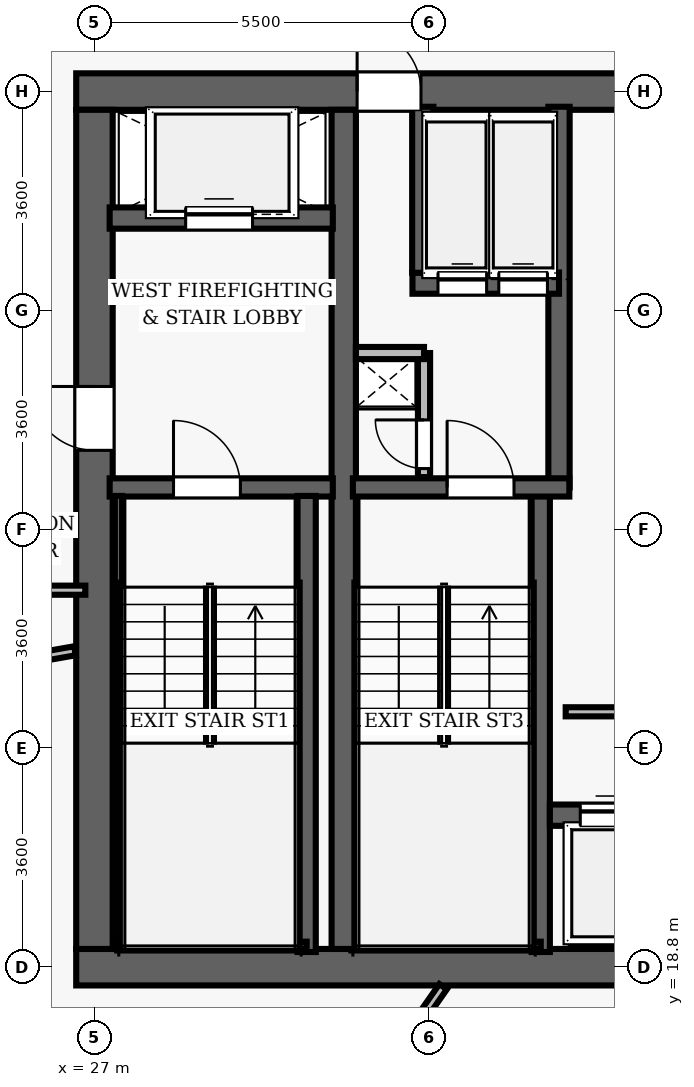
"""IFC4 building model, lengths in metres.
Left out: names, types, materials, properties, quantities, classifications, styles, units other than length and angle.
Written with IfcOpenShell. Run it as: python <this file> out.ifc"""

import sys

from ifc_helpers import new_model, si_unit, direction, frame, frame_2d, origin, place, context, subcontext, project, spatial, rectangle, extrude, element, fill, save


model = new_model("IFC4")
c1 = context("Model", 3, precision=1e-05, world=origin(), true_north=direction((0.0, 1.0)))
c2 = subcontext(c1, "Body", "Model", "MODEL_VIEW")
j1 = project(units=[si_unit("LENGTHUNIT", "METRE"), si_unit("PLANEANGLEUNIT", "RADIAN")], contexts=[c1])
p1 = place(None, origin())
s1 = spatial("IfcSite", under=j1, at=p1, CompositionType="ELEMENT")
p2 = place(p1, origin())
s2 = spatial("IfcBuilding", under=s1, at=p2, CompositionType="ELEMENT")
p3 = place(p2, frame((0.0, 0.0, 158.8)))
s3 = spatial("IfcBuildingStorey", under=s2, at=p3, CompositionType="ELEMENT", Elevation=158.8)
p4 = place(p3, frame((26.7, 18.8, 0.0), z_axis=(0.0, 0.0, 1.0), x_axis=(1.0, 0.0, 0.0)))
e1 = element("IfcWall", 1, at=p4, inside=s3, PredefinedType="SHEAR", context=c2, shape_type="SweptSolid", body=[
    extrude(rectangle(XDim=22.6, YDim=0.6, at=frame_2d((11.3, 0.0))), origin(), (0.0, 0.0, 1.0), 3.5),
])
p5 = place(p4, frame((14.52, 0.0, 0.0)))
e2 = element("IfcOpeningElement", 2, at=p5, cuts=e1, PredefinedType="OPENING", context=c2, shape_type="SweptSolid", body=[
    extrude(rectangle(XDim=1.05, YDim=2.15, at=frame_2d((0.525, 1.075))), frame((0.0, 0.31, 0.0), z_axis=(0.0, -1.0, 0.0), x_axis=(1.0, 0.0, 0.0)), (0.0, 0.0, 1.0), 0.62),
])
p6 = place(p3, frame((26.7, 33.2, 0.0), z_axis=(0.0, 0.0, 1.0), x_axis=(1.0, 0.0, 0.0)))
e3 = element("IfcWall", 3, at=p6, inside=s3, PredefinedType="SHEAR", context=c2, shape_type="SweptSolid", body=[
    extrude(rectangle(XDim=22.6, YDim=0.6, at=frame_2d((11.3, 0.0))), origin(), (0.0, 0.0, 1.0), 3.5),
])
p7 = place(p6, frame((4.62, 0.0, 0.0)))
e4 = element("IfcOpeningElement", 4, at=p7, cuts=e3, PredefinedType="OPENING", context=c2, shape_type="SweptSolid", body=[
    extrude(rectangle(XDim=1.05, YDim=2.15, at=frame_2d((0.525, 1.075))), frame((0.0, 0.31, 0.0), z_axis=(0.0, -1.0, 0.0), x_axis=(1.0, 0.0, 0.0)), (0.0, 0.0, 1.0), 0.62),
])
p8 = place(p6, frame((14.52, 0.0, 0.0)))
e5 = element("IfcOpeningElement", 5, at=p8, cuts=e3, PredefinedType="OPENING", context=c2, shape_type="SweptSolid", body=[
    extrude(rectangle(XDim=1.05, YDim=2.15, at=frame_2d((0.525, 1.075))), frame((0.0, 0.31, 0.0), z_axis=(0.0, -1.0, 0.0), x_axis=(1.0, 0.0, 0.0)), (0.0, 0.0, 1.0), 0.62),
])
p9 = place(p3, frame((27.0, 19.1, 0.0), z_axis=(0.0, 0.0, 1.0), x_axis=(0.0, 1.0, 0.0)))
e6 = element("IfcWall", 6, at=p9, inside=s3, PredefinedType="SHEAR", context=c2, shape_type="SweptSolid", body=[
    extrude(rectangle(XDim=13.8, YDim=0.6, at=frame_2d((6.9, 0.0))), origin(), (0.0, 0.0, 1.0), 3.5),
])
p10 = place(p9, frame((8.2, 0.0, 0.0)))
e7 = element("IfcOpeningElement", 7, at=p10, cuts=e6, PredefinedType="OPENING", context=c2, shape_type="SweptSolid", body=[
    extrude(rectangle(XDim=1.05, YDim=2.15, at=frame_2d((0.525, 1.075))), frame((0.0, 0.31, 0.0), z_axis=(0.0, -1.0, 0.0), x_axis=(1.0, 0.0, 0.0)), (0.0, 0.0, 1.0), 0.62),
])
p11 = place(p3, frame((31.1, 19.1, 0.0), z_axis=(0.0, 0.0, 1.0), x_axis=(0.0, 1.0, 0.0)))
e8 = element("IfcWall", 8, at=p11, inside=s3, PredefinedType="SHEAR", context=c2, shape_type="SweptSolid", body=[
    extrude(rectangle(XDim=13.8, YDim=0.4, at=frame_2d((6.9, 0.0))), origin(), (0.0, 0.0, 1.0), 3.5),
])
p12 = place(p3, frame((27.25, 26.69, 0.0), z_axis=(0.0, 0.0, 1.0), x_axis=(1.0, 0.0, 0.0)))
e9 = element("IfcWall", 9, at=p12, inside=s3, PredefinedType="SHEAR", context=c2, shape_type="SweptSolid", body=[
    extrude(rectangle(XDim=3.67, YDim=0.3, at=frame_2d((1.835, 0.0))), origin(), (0.0, 0.0, 1.0), 3.5),
])
p13 = place(p12, frame((1.05, 0.0, 0.0)))
e10 = element("IfcOpeningElement", 10, at=p13, cuts=e9, PredefinedType="OPENING", context=c2, shape_type="SweptSolid", body=[
    extrude(rectangle(XDim=1.1, YDim=2.15, at=frame_2d((0.55, 1.075))), frame((0.0, 0.16, 0.0), z_axis=(0.0, -1.0, 0.0), x_axis=(1.0, 0.0, 0.0)), (0.0, 0.0, 1.0), 0.32),
])
p14 = place(p3, frame((30.49, 19.05, 0.0), z_axis=(0.0, 0.0, 1.0), x_axis=(0.0, 1.0, 0.0)))
e11 = element("IfcWall", 11, at=p14, inside=s3, PredefinedType="SHEAR", context=c2, shape_type="SweptSolid", body=[
    extrude(rectangle(XDim=7.5, YDim=0.3, at=frame_2d((3.75, 0.0))), origin(), (0.0, 0.0, 1.0), 3.5),
])
p15 = place(p3, frame((27.395, 19.1, 0.0), z_axis=(0.0, 0.0, 1.0), x_axis=(0.0, 1.0, 0.0)))
e12 = element("IfcWall", 12, at=p15, inside=s3, PredefinedType="SHEAR", context=c2, shape_type="SweptSolid", body=[
    extrude(rectangle(XDim=7.45, YDim=0.12, at=frame_2d((3.725, 0.0))), origin(), (0.0, 0.0, 1.0), 3.5),
])
p16 = place(p3, frame((27.395, 19.16, 0.0), z_axis=(0.0, 0.0, 1.0), x_axis=(1.0, 0.0, 0.0)))
e13 = element("IfcWall", 13, at=p16, inside=s3, PredefinedType="SHEAR", context=c2, shape_type="SweptSolid", body=[
    extrude(rectangle(XDim=3.095, YDim=0.12, at=frame_2d((1.547, 0.0))), origin(), (0.0, 0.0, 1.0), 3.5),
])
p17 = place(p3, frame((27.25, 31.12, 0.0), z_axis=(0.0, 0.0, 1.0), x_axis=(1.0, 0.0, 0.0)))
e14 = element("IfcWall", 14, at=p17, inside=s3, PredefinedType="SHEAR", context=c2, shape_type="SweptSolid", body=[
    extrude(rectangle(XDim=3.67, YDim=0.35, at=frame_2d((1.835, 0.0))), origin(), (0.0, 0.0, 1.0), 2.675),
])
p18 = place(p17, frame((1.25, 0.0, 0.0)))
e15 = element("IfcOpeningElement", 15, at=p18, cuts=e14, PredefinedType="OPENING", context=c2, shape_type="SweptSolid", body=[
    extrude(rectangle(XDim=1.1, YDim=2.15, at=frame_2d((0.55, 1.075))), frame((0.0, 0.185, 0.0), z_axis=(0.0, -1.0, 0.0), x_axis=(1.0, 0.0, 0.0)), (0.0, 0.0, 1.0), 0.37),
])
p19 = place(p3, frame((34.34, 19.05, 0.0), z_axis=(0.0, 0.0, 1.0), x_axis=(0.0, 1.0, 0.0)))
e16 = element("IfcWall", 16, at=p19, inside=s3, PredefinedType="SHEAR", context=c2, shape_type="SweptSolid", body=[
    extrude(rectangle(XDim=7.5, YDim=0.3, at=frame_2d((3.75, 0.0))), origin(), (0.0, 0.0, 1.0), 3.5),
])
p20 = place(p3, frame((34.64, 26.69, 0.0), z_axis=(0.0, 0.0, 1.0), x_axis=(0.0, 1.0, 0.0)))
e17 = element("IfcWall", 17, at=p20, inside=s3, PredefinedType="SHEAR", context=c2, shape_type="SweptSolid", body=[
    extrude(rectangle(XDim=6.26, YDim=0.35, at=frame_2d((3.13, 0.0))), origin(), (0.0, 0.0, 1.0), 3.5),
])
p21 = place(p3, frame((31.25, 26.69, 0.0), z_axis=(0.0, 0.0, 1.0), x_axis=(1.0, 0.0, 0.0)))
e18 = element("IfcWall", 18, at=p21, inside=s3, PredefinedType="SHEAR", context=c2, shape_type="SweptSolid", body=[
    extrude(rectangle(XDim=3.56, YDim=0.3, at=frame_2d((1.78, 0.0))), origin(), (0.0, 0.0, 1.0), 3.5),
])
p22 = place(p21, frame((1.55, 0.0, 0.0)))
e19 = element("IfcOpeningElement", 19, at=p22, cuts=e18, PredefinedType="OPENING", context=c2, shape_type="SweptSolid", body=[
    extrude(rectangle(XDim=1.1, YDim=2.15, at=frame_2d((0.55, 1.075))), frame((0.0, 0.16, 0.0), z_axis=(0.0, -1.0, 0.0), x_axis=(1.0, 0.0, 0.0)), (0.0, 0.0, 1.0), 0.32),
])
p23 = place(p3, frame((31.3, 19.16, 0.0), z_axis=(0.0, 0.0, 1.0), x_axis=(1.0, 0.0, 0.0)))
e20 = element("IfcWall", 20, at=p23, inside=s3, PredefinedType="SHEAR", context=c2, shape_type="SweptSolid", body=[
    extrude(rectangle(XDim=3.04, YDim=0.12, at=frame_2d((1.52, 0.0))), origin(), (0.0, 0.0, 1.0), 3.5),
])
p24 = place(p3, frame((32.23, 30.05, 0.0), z_axis=(0.0, 0.0, 1.0), x_axis=(1.0, 0.0, 0.0)))
e21 = element("IfcWall", 21, at=p24, inside=s3, PredefinedType="SHEAR", context=c2, shape_type="SweptSolid", body=[
    extrude(rectangle(XDim=2.41, YDim=0.35, at=frame_2d((1.205, 0.0))), origin(), (0.0, 0.0, 1.0), 2.675),
])
p25 = place(p24, frame((0.42, 0.0, 0.0)))
e22 = element("IfcOpeningElement", 22, at=p25, cuts=e21, PredefinedType="OPENING", context=c2, shape_type="SweptSolid", body=[
    extrude(rectangle(XDim=0.8, YDim=2.15, at=frame_2d((0.4, 1.075))), frame((0.0, 0.185, 0.0), z_axis=(0.0, -1.0, 0.0), x_axis=(1.0, 0.0, 0.0)), (0.0, 0.0, 1.0), 0.37),
])
p26 = place(p24, frame((1.42, 0.0, 0.0)))
e23 = element("IfcOpeningElement", 23, at=p26, cuts=e21, PredefinedType="OPENING", context=c2, shape_type="SweptSolid", body=[
    extrude(rectangle(XDim=0.8, YDim=2.15, at=frame_2d((0.4, 1.075))), frame((0.0, 0.185, 0.0), z_axis=(0.0, -1.0, 0.0), x_axis=(1.0, 0.0, 0.0)), (0.0, 0.0, 1.0), 0.37),
])
p27 = place(p3, frame((32.4, 30.22, 0.0), z_axis=(0.0, 0.0, 1.0), x_axis=(0.0, 1.0, 0.0)))
e24 = element("IfcWall", 24, at=p27, inside=s3, PredefinedType="SHEAR", context=c2, shape_type="SweptSolid", body=[
    extrude(rectangle(XDim=2.73, YDim=0.35, at=frame_2d((1.365, 0.0))), origin(), (0.0, 0.0, 1.0), 2.675),
])
p28 = place(p3, frame((32.42, 26.86, 0.0), z_axis=(0.0, 0.0, 1.0), x_axis=(0.0, 1.0, 0.0)))
e25 = element("IfcWall", 25, at=p28, inside=s3, PredefinedType="PARTITIONING", context=c2, shape_type="SweptSolid", body=[
    extrude(rectangle(XDim=2.04, YDim=0.2, at=frame_2d((1.02, 0.0))), origin(), (0.0, 0.0, 1.0), 2.675),
])
p29 = place(p28, frame((0.14, 0.0, 0.0)))
e26 = element("IfcOpeningElement", 26, at=p29, cuts=e25, PredefinedType="OPENING", context=c2, shape_type="SweptSolid", body=[
    extrude(rectangle(XDim=0.8, YDim=2.05, at=frame_2d((0.4, 1.025))), frame((0.0, 0.11, 0.0), z_axis=(0.0, -1.0, 0.0), x_axis=(1.0, 0.0, 0.0)), (0.0, 0.0, 1.0), 0.22),
])
p30 = place(p3, frame((31.3, 28.9, 0.0), z_axis=(0.0, 0.0, 1.0), x_axis=(1.0, 0.0, 0.0)))
e27 = element("IfcWall", 27, at=p30, inside=s3, PredefinedType="PARTITIONING", context=c2, shape_type="SweptSolid", body=[
    extrude(rectangle(XDim=1.12, YDim=0.2, at=frame_2d((0.56, 0.0))), origin(), (0.0, 0.0, 1.0), 2.675),
])
p31 = place(p3, frame((34.49, 21.3, 0.0), z_axis=(0.0, 0.0, 1.0), x_axis=(1.0, 0.0, 0.0)))
e28 = element("IfcWall", 28, at=p31, inside=s3, PredefinedType="SHEAR", context=c2, shape_type="SweptSolid", body=[
    extrude(rectangle(XDim=6.68, YDim=0.35, at=frame_2d((3.34, 0.0))), origin(), (0.0, 0.0, 1.0), 2.675),
])
p32 = place(p31, frame((0.5, 0.0, 0.0)))
e29 = element("IfcOpeningElement", 29, at=p32, cuts=e28, PredefinedType="OPENING", context=c2, shape_type="SweptSolid", body=[
    extrude(rectangle(XDim=0.9, YDim=2.15, at=frame_2d((0.45, 1.075))), frame((0.0, 0.185, 0.0), z_axis=(0.0, -1.0, 0.0), x_axis=(1.0, 0.0, 0.0)), (0.0, 0.0, 1.0), 0.37),
])
p33 = place(p31, frame((2.58, 0.0, 0.0)))
e30 = element("IfcOpeningElement", 30, at=p33, cuts=e28, PredefinedType="OPENING", context=c2, shape_type="SweptSolid", body=[
    extrude(rectangle(XDim=0.9, YDim=2.15, at=frame_2d((0.45, 1.075))), frame((0.0, 0.185, 0.0), z_axis=(0.0, -1.0, 0.0), x_axis=(1.0, 0.0, 0.0)), (0.0, 0.0, 1.0), 0.37),
])
p34 = place(p31, frame((4.66, 0.0, 0.0)))
e31 = element("IfcOpeningElement", 31, at=p34, cuts=e28, PredefinedType="OPENING", context=c2, shape_type="SweptSolid", body=[
    extrude(rectangle(XDim=0.9, YDim=2.15, at=frame_2d((0.45, 1.075))), frame((0.0, 0.185, 0.0), z_axis=(0.0, -1.0, 0.0), x_axis=(1.0, 0.0, 0.0)), (0.0, 0.0, 1.0), 0.37),
])
p35 = place(p3, frame((34.75, 23.0, 0.0), z_axis=(0.0, 0.0, 1.0), x_axis=(1.0, 0.0, 0.0)))
e32 = element("IfcWall", 32, at=p35, inside=s3, PredefinedType="PARTITIONING", context=c2, shape_type="SweptSolid", body=[
    extrude(rectangle(XDim=6.25, YDim=0.15, at=frame_2d((3.125, 0.0))), origin(), (0.0, 0.0, 1.0), 2.675),
])
p36 = place(p3, frame((14.5, 25.0, 0.0), z_axis=(0.0, 0.0, 1.0), x_axis=(1.0, 0.0, 0.0)))
e33 = element("IfcWall", 33, at=p36, inside=s3, PredefinedType="PARTITIONING", context=c2, shape_type="SweptSolid", body=[
    extrude(rectangle(XDim=12.35, YDim=0.15, at=frame_2d((6.175, 0.0))), origin(), (0.0, 0.0, 1.0), 2.675),
])
p37 = place(p3, frame((26.68, 24.004, 0.0), z_axis=(0.0, 0.0, 1.0), x_axis=(-0.984810123678, -0.173634732419, 0.0)))
e34 = element("IfcWall", 34, at=p37, inside=s3, PredefinedType="PARTITIONING", context=c2, shape_type="SweptSolid", body=[
    extrude(rectangle(XDim=14.242, YDim=0.15, at=frame_2d((7.121, 0.0))), origin(), (0.0, 0.0, 1.0), 2.675),
])
p38 = place(p3, frame((32.734, 18.48, 0.0), z_axis=(0.0, 0.0, 1.0), x_axis=(-0.573572172443, -0.819155029893, 0.0)))
e35 = element("IfcWall", 35, at=p38, inside=s3, PredefinedType="PARTITIONING", context=c2, shape_type="SweptSolid", body=[
    extrude(rectangle(XDim=13.874, YDim=0.15, at=frame_2d((6.937, 0.0))), origin(), (0.0, 0.0, 1.0), 2.675),
])
p39 = place(p13, origin())
e36 = element("IfcDoor", 36, at=p39, inside=s3, OperationType="SINGLE_SWING_LEFT", PredefinedType="DOOR", context=c2, shape_type="SweptSolid", body=[
    extrude(rectangle(XDim=1.1, YDim=2.15, at=frame_2d((0.55, 1.075))), frame((0.0, 0.025, 0.0), z_axis=(0.0, -1.0, 0.0), x_axis=(1.0, 0.0, 0.0)), (0.0, 0.0, 1.0), 0.05),
])
fill(e10, e36)
p40 = place(p10, origin())
e37 = element("IfcDoor", 37, at=p40, inside=s3, OperationType="SINGLE_SWING_RIGHT", PredefinedType="DOOR", context=c2, shape_type="SweptSolid", body=[
    extrude(rectangle(XDim=1.05, YDim=2.15, at=frame_2d((0.525, 1.075))), frame((0.0, 0.025, 0.0), z_axis=(0.0, -1.0, 0.0), x_axis=(1.0, 0.0, 0.0)), (0.0, 0.0, 1.0), 0.05),
])
fill(e7, e37)
p41 = place(p22, origin())
e38 = element("IfcDoor", 38, at=p41, inside=s3, OperationType="SINGLE_SWING_LEFT", PredefinedType="DOOR", context=c2, shape_type="SweptSolid", body=[
    extrude(rectangle(XDim=1.1, YDim=2.15, at=frame_2d((0.55, 1.075))), frame((0.0, 0.025, 0.0), z_axis=(0.0, -1.0, 0.0), x_axis=(1.0, 0.0, 0.0)), (0.0, 0.0, 1.0), 0.05),
])
fill(e19, e38)
p42 = place(p29, origin())
e39 = element("IfcDoor", 39, at=p42, inside=s3, OperationType="SINGLE_SWING_RIGHT", PredefinedType="DOOR", context=c2, shape_type="SweptSolid", body=[
    extrude(rectangle(XDim=0.8, YDim=2.05, at=frame_2d((0.4, 1.025))), frame((0.0, 0.025, 0.0), z_axis=(0.0, -1.0, 0.0), x_axis=(1.0, 0.0, 0.0)), (0.0, 0.0, 1.0), 0.05),
])
fill(e26, e39)
p43 = place(p7, origin())
e40 = element("IfcDoor", 40, at=p43, inside=s3, OperationType="SINGLE_SWING_LEFT", PredefinedType="DOOR", context=c2, shape_type="SweptSolid", body=[
    extrude(rectangle(XDim=1.05, YDim=2.15, at=frame_2d((0.525, 1.075))), frame((0.0, 0.025, 0.0), z_axis=(0.0, -1.0, 0.0), x_axis=(1.0, 0.0, 0.0)), (0.0, 0.0, 1.0), 0.05),
])
fill(e4, e40)
p44 = place(p32, origin())
e41 = element("IfcDoor", 41, at=p44, inside=s3, OperationType="SLIDING_TO_LEFT", PredefinedType="DOOR", context=c2, shape_type="SweptSolid", body=[
    extrude(rectangle(XDim=0.9, YDim=2.15, at=frame_2d((0.45, 1.075))), frame((0.0, 0.025, 0.0), z_axis=(0.0, -1.0, 0.0), x_axis=(1.0, 0.0, 0.0)), (0.0, 0.0, 1.0), 0.05),
])
fill(e29, e41)
p45 = place(p18, origin())
e42 = element("IfcDoor", 42, at=p45, inside=s3, OperationType="SLIDING_TO_LEFT", PredefinedType="DOOR", context=c2, shape_type="SweptSolid", body=[
    extrude(rectangle(XDim=1.1, YDim=2.15, at=frame_2d((0.55, 1.075))), frame((0.0, 0.025, 0.0), z_axis=(0.0, -1.0, 0.0), x_axis=(1.0, 0.0, 0.0)), (0.0, 0.0, 1.0), 0.05),
])
fill(e15, e42)
p46 = place(p25, origin())
e43 = element("IfcDoor", 43, at=p46, inside=s3, OperationType="SLIDING_TO_LEFT", PredefinedType="DOOR", context=c2, shape_type="SweptSolid", body=[
    extrude(rectangle(XDim=0.8, YDim=2.15, at=frame_2d((0.4, 1.075))), frame((0.0, 0.025, 0.0), z_axis=(0.0, -1.0, 0.0), x_axis=(1.0, 0.0, 0.0)), (0.0, 0.0, 1.0), 0.05),
])
fill(e22, e43)
p47 = place(p26, origin())
e44 = element("IfcDoor", 44, at=p47, inside=s3, OperationType="SLIDING_TO_LEFT", PredefinedType="DOOR", context=c2, shape_type="SweptSolid", body=[
    extrude(rectangle(XDim=0.8, YDim=2.15, at=frame_2d((0.4, 1.075))), frame((0.0, 0.025, 0.0), z_axis=(0.0, -1.0, 0.0), x_axis=(1.0, 0.0, 0.0)), (0.0, 0.0, 1.0), 0.05),
])
fill(e23, e44)
save(model, sys.argv[1])
